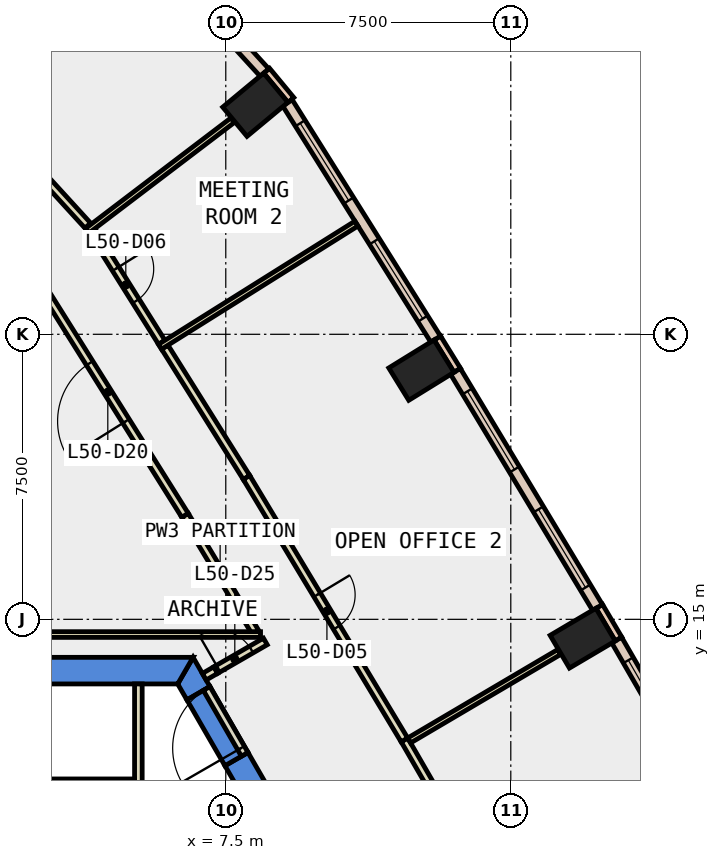
"""IFC4 building model, lengths in metres.
Left out: names, types, materials, properties, quantities, classifications, styles, units other than length and angle.
Written with IfcOpenShell. Run it as: python <this file> out.ifc"""

import sys

from ifc_helpers import new_model, si_unit, direction, frame, frame_2d, origin, origin_2d, place, context, subcontext, project, spatial, polyline, rectangle, outline, extrude, element, fill, save


model = new_model("IFC4")
c1 = context("Model", 3, precision=1e-05, world=origin(), true_north=direction((0.0, 1.0)))
c2 = subcontext(c1, "Body", "Model", "MODEL_VIEW")
j1 = project(units=[si_unit("LENGTHUNIT", "METRE"), si_unit("PLANEANGLEUNIT", "RADIAN")], contexts=[c1])
p1 = place(None, origin())
s1 = spatial("IfcSite", under=j1, at=p1, CompositionType="ELEMENT")
p2 = place(p1, origin())
s2 = spatial("IfcBuilding", under=s1, at=p2, CompositionType="ELEMENT")
p3 = place(p2, frame((0.0, 0.0, 223.4)))
s3 = spatial("IfcBuildingStorey", under=s2, at=p3, CompositionType="ELEMENT", Elevation=223.4)
for number, where, z_axis, x_axis in (
    (1, (16.892, 14.504, -0.4), (0.0, 0.0, 1.0), (-0.509, 0.861, 0.0)),
    (2, (12.648, 21.557, -0.4), (0.0, 0.0, 1.0), (-0.525, 0.851, 0.0)),
    (3, (8.278, 28.54, -0.4), (0.0, 0.0, 1.0), (-0.639, 0.769, 0.0)),
):
    element("IfcColumn", number, at=place(p3, frame(where, z_axis=z_axis, x_axis=x_axis)), inside=s3, PredefinedType="COLUMN", context=c2, shape_type="SweptSolid", body=[
        extrude(rectangle(XDim=1.0, YDim=1.4, at=origin_2d()), origin(), (0.0, 0.0, 1.0), 4.2),
    ])
p4 = place(p3, frame((0.0, 0.0, -0.4)))
e4 = element("IfcWall", 4, at=p4, inside=s3, PredefinedType="SHEAR", context=c2, shape_type="SweptSolid", body=[
    extrude(outline(polyline([(8.084, 11.498), (7.478, 11.148), (12.471, 2.5), (13.279, 2.5), (8.084, 11.498)])), origin(), (0.0, 0.0, 1.0), 4.2),
])
p5 = place(p3, frame((0.0, 0.0, -0.4)))
e5 = element("IfcWall", 5, at=p5, inside=s3, PredefinedType="SHEAR", context=c2, shape_type="SweptSolid", body=[
    extrude(outline(polyline([(6.478, 12.88), (7.084, 13.23), (6.64, 14.0), (6.235, 13.3), (6.478, 12.88)])), origin(), (0.0, 0.0, 1.0), 4.2),
])
p6 = place(p3, frame((0.0, 0.0, 3.6)))
e6 = element("IfcWall", 6, at=p6, inside=s3, PredefinedType="SHEAR", context=c2, shape_type="SweptSolid", body=[
    extrude(outline(polyline([(7.084, 13.23), (6.478, 12.88), (7.478, 11.148), (8.084, 11.498), (7.084, 13.23)])), origin(), (0.0, 0.0, 1.0), 0.2),
])
p7 = place(p3, frame((0.0, 0.0, -0.4)))
e7 = element("IfcWall", 7, at=p7, inside=s3, PredefinedType="SHEAR", context=c2, shape_type="SweptSolid", body=[
    extrude(outline(polyline([(6.64, 14.0), (-6.64, 14.0), (-6.235, 13.3), (6.235, 13.3), (6.64, 14.0)])), origin(), (0.0, 0.0, 1.0), 4.2),
])
p8 = place(p3, frame((17.835, 14.481, 0.0), z_axis=(0.0, 0.0, 1.0), x_axis=(-0.508161541526, 0.861261776531, 0.0)))
e8 = element("IfcWall", 8, at=p8, inside=s3, PredefinedType="STANDARD", context=c2, shape_type="SweptSolid", body=[
    extrude(rectangle(XDim=1.0, YDim=0.2, at=frame_2d((0.5, 0.0))), origin(), (0.0, 0.0, 1.0), 3.8),
])
p9 = place(p3, frame((13.592, 21.552, 0.0), z_axis=(0.0, 0.0, 1.0), x_axis=(-0.525825307325, 0.850592585306, 0.0)))
e9 = element("IfcWall", 9, at=p9, inside=s3, PredefinedType="STANDARD", context=c2, shape_type="SweptSolid", body=[
    extrude(rectangle(XDim=1.0, YDim=0.2, at=frame_2d((0.5, 0.0))), origin(), (0.0, 0.0, 1.0), 3.8),
])
p10 = place(p3, frame((9.213, 28.666, 0.0), z_axis=(0.0, 0.0, 1.0), x_axis=(-0.637972365578, 0.770059257953, 0.0)))
e10 = element("IfcWall", 10, at=p10, inside=s3, PredefinedType="STANDARD", context=c2, shape_type="SweptSolid", body=[
    extrude(rectangle(XDim=1.0, YDim=0.2, at=frame_2d((0.5, 0.0))), origin(), (0.0, 0.0, 1.0), 3.8),
])
p11 = place(p3, frame((21.411, 8.177, 0.0), z_axis=(0.0, 0.0, 1.0), x_axis=(-0.499968351115, 0.866043675505, 0.0)))
e11 = element("IfcWall", 11, at=p11, inside=s3, PredefinedType="STANDARD", context=c2, shape_type="SweptSolid", body=[
    extrude(rectangle(XDim=7.248, YDim=0.3, at=frame_2d((3.624, 0.0))), origin(), (0.0, 0.0, 1.0), 3.8),
])
p12 = place(p11, frame((0.612, 0.0, 0.9)))
e12 = element("IfcOpeningElement", 12, at=p12, cuts=e11, PredefinedType="OPENING", context=c2, shape_type="SweptSolid", body=[
    extrude(rectangle(XDim=2.4, YDim=2.6, at=frame_2d((1.2, 1.3))), frame((0.0, 0.16, 0.0), z_axis=(0.0, -1.0, 0.0), x_axis=(1.0, 0.0, 0.0)), (0.0, 0.0, 1.0), 0.32),
])
p13 = place(p11, frame((4.236, 0.0, 0.9)))
e13 = element("IfcOpeningElement", 13, at=p13, cuts=e11, PredefinedType="OPENING", context=c2, shape_type="SweptSolid", body=[
    extrude(rectangle(XDim=2.4, YDim=2.6, at=frame_2d((1.2, 1.3))), frame((0.0, 0.16, 0.0), z_axis=(0.0, -1.0, 0.0), x_axis=(1.0, 0.0, 0.0)), (0.0, 0.0, 1.0), 0.32),
])
p14 = place(p3, frame((17.281, 15.313, 0.0), z_axis=(0.0, 0.0, 1.0), x_axis=(-0.515560283412, 0.856853309597, 0.0)))
e14 = element("IfcWall", 14, at=p14, inside=s3, PredefinedType="STANDARD", context=c2, shape_type="SweptSolid", body=[
    extrude(rectangle(XDim=7.249, YDim=0.3, at=frame_2d((3.624, 0.0))), origin(), (0.0, 0.0, 1.0), 3.8),
])
p15 = place(p14, frame((0.612, 0.0, 0.9)))
e15 = element("IfcOpeningElement", 15, at=p15, cuts=e14, PredefinedType="OPENING", context=c2, shape_type="SweptSolid", body=[
    extrude(rectangle(XDim=2.4, YDim=2.6, at=frame_2d((1.2, 1.3))), frame((0.0, 0.16, 0.0), z_axis=(0.0, -1.0, 0.0), x_axis=(1.0, 0.0, 0.0)), (0.0, 0.0, 1.0), 0.32),
])
p16 = place(p14, frame((4.236, 0.0, 0.9)))
e16 = element("IfcOpeningElement", 16, at=p16, cuts=e14, PredefinedType="OPENING", context=c2, shape_type="SweptSolid", body=[
    extrude(rectangle(XDim=2.4, YDim=2.6, at=frame_2d((1.2, 1.3))), frame((0.0, 0.16, 0.0), z_axis=(0.0, -1.0, 0.0), x_axis=(1.0, 0.0, 0.0)), (0.0, 0.0, 1.0), 0.32),
])
p17 = place(p3, frame((13.021, 22.374, 0.0), z_axis=(0.0, 0.0, 1.0), x_axis=(-0.531239262679, 0.847221839773, 0.0)))
e17 = element("IfcWall", 17, at=p17, inside=s3, PredefinedType="STANDARD", context=c2, shape_type="SweptSolid", body=[
    extrude(rectangle(XDim=7.339, YDim=0.3, at=frame_2d((3.67, 0.0))), origin(), (0.0, 0.0, 1.0), 3.8),
])
p18 = place(p17, frame((0.635, 0.0, 0.9)))
e18 = element("IfcOpeningElement", 18, at=p18, cuts=e17, PredefinedType="OPENING", context=c2, shape_type="SweptSolid", body=[
    extrude(rectangle(XDim=2.4, YDim=2.6, at=frame_2d((1.2, 1.3))), frame((0.0, 0.16, 0.0), z_axis=(0.0, -1.0, 0.0), x_axis=(1.0, 0.0, 0.0)), (0.0, 0.0, 1.0), 0.32),
])
p19 = place(p17, frame((4.304, 0.0, 0.9)))
e19 = element("IfcOpeningElement", 19, at=p19, cuts=e17, PredefinedType="OPENING", context=c2, shape_type="SweptSolid", body=[
    extrude(rectangle(XDim=2.4, YDim=2.6, at=frame_2d((1.2, 1.3))), frame((0.0, 0.16, 0.0), z_axis=(0.0, -1.0, 0.0), x_axis=(1.0, 0.0, 0.0)), (0.0, 0.0, 1.0), 0.32),
])
p20 = place(p3, frame((8.518, 29.388, 0.0), z_axis=(0.0, 0.0, 1.0), x_axis=(-0.674487390017, 0.738286367684, 0.0)))
e20 = element("IfcWall", 20, at=p20, inside=s3, PredefinedType="STANDARD", context=c2, shape_type="SweptSolid", body=[
    extrude(rectangle(XDim=4.248, YDim=0.3, at=frame_2d((2.124, 0.0))), origin(), (0.0, 0.0, 1.0), 3.8),
])
p21 = place(p20, frame((1.424, 0.0, 0.9)))
e21 = element("IfcOpeningElement", 21, at=p21, cuts=e20, PredefinedType="OPENING", context=c2, shape_type="SweptSolid", body=[
    extrude(rectangle(XDim=1.4, YDim=2.6, at=frame_2d((0.7, 1.3))), frame((0.0, 0.16, 0.0), z_axis=(0.0, -1.0, 0.0), x_axis=(1.0, 0.0, 0.0)), (0.0, 0.0, 1.0), 0.32),
])
p22 = place(p3, frame((6.934, 13.49, 0.0), z_axis=(0.0, 0.0, 1.0), x_axis=(0.865871789474, 0.500265973451, 0.0)))
e22 = element("IfcWall", 22, at=p22, inside=s3, PredefinedType="PARTITIONING", context=c2, shape_type="SweptSolid", body=[
    extrude(rectangle(XDim=0.35, YDim=0.2, at=frame_2d((0.175, 0.0))), origin(), (0.0, 0.0, 1.0), 2.4),
])
p23 = place(p3, frame((8.276, 14.664, 0.0), z_axis=(0.0, 0.0, 1.0), x_axis=(-0.515416266777, 0.85693994652, 0.0)))
e23 = element("IfcWall", 23, at=p23, inside=s3, PredefinedType="PARTITIONING", context=c2, shape_type="SweptSolid", body=[
    extrude(rectangle(XDim=3.587, YDim=0.2, at=frame_2d((1.793, 0.0))), origin(), (0.0, 0.0, 1.0), 3.8),
])
p24 = place(p3, frame((6.427, 17.738, 0.0), z_axis=(0.0, 0.0, 1.0), x_axis=(-0.531335643981, 0.847161397512, 0.0)))
e24 = element("IfcWall", 24, at=p24, inside=s3, PredefinedType="PARTITIONING", context=c2, shape_type="SweptSolid", body=[
    extrude(rectangle(XDim=7.647, YDim=0.2, at=frame_2d((3.823, 0.0))), origin(), (0.0, 0.0, 1.0), 3.8),
])
p25 = place(p24, frame((2.923, 0.0, 0.0)))
e25 = element("IfcOpeningElement", 25, at=p25, cuts=e24, PredefinedType="OPENING", context=c2, shape_type="SweptSolid", body=[
    extrude(rectangle(XDim=1.8, YDim=2.1, at=frame_2d((0.9, 1.05))), frame((0.0, 0.11, 0.0), z_axis=(0.0, -1.0, 0.0), x_axis=(1.0, 0.0, 0.0)), (0.0, 0.0, 1.0), 0.22),
])
p26 = place(p3, frame((12.202, 11.828, 0.0), z_axis=(0.0, 0.0, 1.0), x_axis=(0.499919823193, -0.866071688937, 0.0)))
e26 = element("IfcWall", 26, at=p26, inside=s3, PredefinedType="PARTITIONING", context=c2, shape_type="SweptSolid", body=[
    extrude(rectangle(XDim=8.209, YDim=0.2, at=frame_2d((4.104, 0.0))), origin(), (0.0, 0.0, 1.0), 3.8),
])
p27 = place(p26, frame((3.604, 0.0, 0.0)))
e27 = element("IfcOpeningElement", 27, at=p27, cuts=e26, PredefinedType="OPENING", context=c2, shape_type="SweptSolid", body=[
    extrude(rectangle(XDim=1.0, YDim=2.1, at=frame_2d((0.5, 1.05))), frame((0.0, 0.11, 0.0), z_axis=(0.0, -1.0, 0.0), x_axis=(1.0, 0.0, 0.0)), (0.0, 0.0, 1.0), 0.22),
])
p28 = place(p3, frame((5.895, 22.162, 0.0), z_axis=(0.0, 0.0, 1.0), x_axis=(0.531245023709, -0.847218227368, 0.0)))
e28 = element("IfcWall", 28, at=p28, inside=s3, PredefinedType="PARTITIONING", context=c2, shape_type="SweptSolid", body=[
    extrude(rectangle(XDim=4.049, YDim=0.2, at=frame_2d((2.024, 0.0))), origin(), (0.0, 0.0, 1.0), 3.8),
])
p29 = place(p3, frame((8.046, 18.732, 0.0), z_axis=(0.0, 0.0, 1.0), x_axis=(0.515502328211, -0.856888178007, 0.0)))
e29 = element("IfcWall", 29, at=p29, inside=s3, PredefinedType="PARTITIONING", context=c2, shape_type="SweptSolid", body=[
    extrude(rectangle(XDim=8.058, YDim=0.2, at=frame_2d((4.029, 0.0))), origin(), (0.0, 0.0, 1.0), 3.8),
])
p30 = place(p29, frame((3.604, 0.0, 0.0)))
e30 = element("IfcOpeningElement", 30, at=p30, cuts=e29, PredefinedType="OPENING", context=c2, shape_type="SweptSolid", body=[
    extrude(rectangle(XDim=1.0, YDim=2.1, at=frame_2d((0.5, 1.05))), frame((0.0, 0.11, 0.0), z_axis=(0.0, -1.0, 0.0), x_axis=(1.0, 0.0, 0.0)), (0.0, 0.0, 1.0), 0.22),
])
p31 = place(p3, frame((3.923, 25.307, 0.0), z_axis=(0.0, 0.0, 1.0), x_axis=(0.531150612982, -0.847277419934, 0.0)))
e31 = element("IfcWall", 31, at=p31, inside=s3, PredefinedType="PARTITIONING", context=c2, shape_type="SweptSolid", body=[
    extrude(rectangle(XDim=3.562, YDim=0.2, at=frame_2d((1.781, 0.0))), origin(), (0.0, 0.0, 1.0), 3.8),
])
p32 = place(p31, frame((1.281, 0.0, 0.0)))
e32 = element("IfcOpeningElement", 32, at=p32, cuts=e31, PredefinedType="OPENING", context=c2, shape_type="SweptSolid", body=[
    extrude(rectangle(XDim=1.0, YDim=2.1, at=frame_2d((0.5, 1.05))), frame((0.0, 0.11, 0.0), z_axis=(0.0, -1.0, 0.0), x_axis=(1.0, 0.0, 0.0)), (0.0, 0.0, 1.0), 0.22),
])
p33 = place(p3, frame((1.841, 27.579, 0.0), z_axis=(0.0, 0.0, 1.0), x_axis=(0.674594755709, -0.738188265668, 0.0)))
e33 = element("IfcWall", 33, at=p33, inside=s3, PredefinedType="PARTITIONING", context=c2, shape_type="SweptSolid", body=[
    extrude(rectangle(XDim=3.006, YDim=0.2, at=frame_2d((1.503, 0.0))), origin(), (0.0, 0.0, 1.0), 3.8),
])
p34 = place(p3, frame((5.2, 13.3, 0.0), z_axis=(0.0, 0.0, 1.0), x_axis=(0.0, -1.0, 0.0)))
e34 = element("IfcWall", 34, at=p34, inside=s3, PredefinedType="PARTITIONING", context=c2, shape_type="SweptSolid", body=[
    extrude(rectangle(XDim=2.7, YDim=0.2, at=frame_2d((1.35, 0.0))), origin(), (0.0, 0.0, 1.0), 3.8),
])
p35 = place(p3, frame((5.1, 10.7, 0.0), z_axis=(0.0, 0.0, 1.0), x_axis=(-1.0, 0.0, 0.0)))
e35 = element("IfcWall", 35, at=p35, inside=s3, PredefinedType="PARTITIONING", context=c2, shape_type="SweptSolid", body=[
    extrude(rectangle(XDim=2.4, YDim=0.2, at=frame_2d((1.2, 0.0))), origin(), (0.0, 0.0, 1.0), 3.8),
])
p36 = place(p35, frame((0.75, 0.0, 0.0)))
e36 = element("IfcOpeningElement", 36, at=p36, cuts=e35, PredefinedType="OPENING", context=c2, shape_type="SweptSolid", body=[
    extrude(rectangle(XDim=0.9, YDim=2.1, at=frame_2d((0.45, 1.05))), frame((0.0, 0.11, 0.0), z_axis=(0.0, -1.0, 0.0), x_axis=(1.0, 0.0, 0.0)), (0.0, 0.0, 1.0), 0.22),
])
p37 = place(p3, frame((8.415, 14.6, 0.0), z_axis=(0.0, 0.0, 1.0), x_axis=(-1.0, 0.0, 0.0)))
e37 = element("IfcWall", 37, at=p37, inside=s3, PredefinedType="PARTITIONING", context=c2, shape_type="SweptSolid", body=[
    extrude(rectangle(XDim=8.015, YDim=0.15, at=frame_2d((4.008, 0.0))), origin(), (0.0, 0.0, 1.0), 3.8),
])
p38 = place(p3, frame((12.326, 11.813, 0.0), z_axis=(0.0, 0.0, 1.0), x_axis=(0.861428100003, 0.507879541353, 0.0)))
e38 = element("IfcWall", 38, at=p38, inside=s3, PredefinedType="PARTITIONING", context=c2, shape_type="SweptSolid", body=[
    extrude(rectangle(XDim=4.58, YDim=0.15, at=frame_2d((2.29, 0.0))), origin(), (0.0, 0.0, 1.0), 3.8),
])
p39 = place(p3, frame((5.77, 22.172, 0.0), z_axis=(0.0, 0.0, 1.0), x_axis=(0.847187879248, 0.531293419171, 0.0)))
e39 = element("IfcWall", 39, at=p39, inside=s3, PredefinedType="PARTITIONING", context=c2, shape_type="SweptSolid", body=[
    extrude(rectangle(XDim=6.1, YDim=0.15, at=frame_2d((3.05, 0.0))), origin(), (0.0, 0.0, 1.0), 3.8),
])
p40 = place(p3, frame((3.856, 25.225, 0.0), z_axis=(0.0, 0.0, 1.0), x_axis=(0.795987848728, 0.605312600792, 0.0)))
e40 = element("IfcWall", 40, at=p40, inside=s3, PredefinedType="PARTITIONING", context=c2, shape_type="SweptSolid", body=[
    extrude(rectangle(XDim=4.804, YDim=0.15, at=frame_2d((2.402, 0.0))), origin(), (0.0, 0.0, 1.0), 3.8),
])
p41 = place(p3, frame((7.997, 11.448, 0.0), z_axis=(0.0, 0.0, 1.0), x_axis=(-0.50002537861, 0.866010750942, 0.0)))
e41 = element("IfcWall", 41, at=p41, inside=s3, PredefinedType="PARTITIONING", context=c2, shape_type="SweptSolid", body=[
    extrude(rectangle(XDim=2.0, YDim=0.2, at=frame_2d((1.0, 0.0))), origin(), (0.0, 0.0, 1.0), 2.4),
])
p42 = place(p41, frame((0.19, 0.0, 0.0)))
e42 = element("IfcOpeningElement", 42, at=p42, cuts=e41, PredefinedType="OPENING", context=c2, shape_type="SweptSolid", body=[
    extrude(rectangle(XDim=1.8, YDim=2.1, at=frame_2d((0.9, 1.05))), frame((0.0, 0.11, 0.0), z_axis=(0.0, -1.0, 0.0), x_axis=(1.0, 0.0, 0.0)), (0.0, 0.0, 1.0), 0.22),
])
p43 = place(p3, frame((7.237, 13.665, 0.0), z_axis=(0.0, 0.0, 1.0), x_axis=(0.865999269783, 0.500045262687, 0.0)))
e43 = element("IfcWall", 43, at=p43, inside=s3, PredefinedType="PARTITIONING", context=c2, shape_type="SweptSolid", body=[
    extrude(rectangle(XDim=1.506, YDim=0.2, at=frame_2d((0.753, 0.0))), origin(), (0.0, 0.0, 1.0), 3.8),
])
p44 = place(p43, frame((0.078, 0.0, 0.0)))
e44 = element("IfcOpeningElement", 44, at=p44, cuts=e43, PredefinedType="OPENING", context=c2, shape_type="SweptSolid", body=[
    extrude(rectangle(XDim=1.0, YDim=2.1, at=frame_2d((0.5, 1.05))), frame((0.0, 0.11, 0.0), z_axis=(0.0, -1.0, 0.0), x_axis=(1.0, 0.0, 0.0)), (0.0, 0.0, 1.0), 0.22),
])
p45 = place(p13, origin())
e45 = element("IfcWindow", 45, at=p45, inside=s3, PartitioningType="SINGLE_PANEL", PredefinedType="WINDOW", context=c2, shape_type="SweptSolid", body=[
    extrude(rectangle(XDim=2.4, YDim=2.6, at=frame_2d((1.2, 1.3))), frame((0.0, 0.03, 0.0), z_axis=(0.0, -1.0, 0.0), x_axis=(1.0, 0.0, 0.0)), (0.0, 0.0, 1.0), 0.06),
])
fill(e13, e45)
p46 = place(p15, origin())
e46 = element("IfcWindow", 46, at=p46, inside=s3, PartitioningType="SINGLE_PANEL", PredefinedType="WINDOW", context=c2, shape_type="SweptSolid", body=[
    extrude(rectangle(XDim=2.4, YDim=2.6, at=frame_2d((1.2, 1.3))), frame((0.0, 0.03, 0.0), z_axis=(0.0, -1.0, 0.0), x_axis=(1.0, 0.0, 0.0)), (0.0, 0.0, 1.0), 0.06),
])
fill(e15, e46)
p47 = place(p16, origin())
e47 = element("IfcWindow", 47, at=p47, inside=s3, PartitioningType="SINGLE_PANEL", PredefinedType="WINDOW", context=c2, shape_type="SweptSolid", body=[
    extrude(rectangle(XDim=2.4, YDim=2.6, at=frame_2d((1.2, 1.3))), frame((0.0, 0.03, 0.0), z_axis=(0.0, -1.0, 0.0), x_axis=(1.0, 0.0, 0.0)), (0.0, 0.0, 1.0), 0.06),
])
fill(e16, e47)
p48 = place(p18, origin())
e48 = element("IfcWindow", 48, at=p48, inside=s3, PartitioningType="SINGLE_PANEL", PredefinedType="WINDOW", context=c2, shape_type="SweptSolid", body=[
    extrude(rectangle(XDim=2.4, YDim=2.6, at=frame_2d((1.2, 1.3))), frame((0.0, 0.03, 0.0), z_axis=(0.0, -1.0, 0.0), x_axis=(1.0, 0.0, 0.0)), (0.0, 0.0, 1.0), 0.06),
])
fill(e18, e48)
p49 = place(p19, origin())
e49 = element("IfcWindow", 49, at=p49, inside=s3, PartitioningType="SINGLE_PANEL", PredefinedType="WINDOW", context=c2, shape_type="SweptSolid", body=[
    extrude(rectangle(XDim=2.4, YDim=2.6, at=frame_2d((1.2, 1.3))), frame((0.0, 0.03, 0.0), z_axis=(0.0, -1.0, 0.0), x_axis=(1.0, 0.0, 0.0)), (0.0, 0.0, 1.0), 0.06),
])
fill(e19, e49)
p50 = place(p30, origin())
e50 = element("IfcDoor", 50, at=p50, inside=s3, OperationType="SINGLE_SWING_RIGHT", PredefinedType="DOOR", context=c2, shape_type="SweptSolid", body=[
    extrude(rectangle(XDim=1.0, YDim=2.1, at=frame_2d((0.5, 1.05))), frame((0.0, 0.025, 0.0), z_axis=(0.0, -1.0, 0.0), x_axis=(1.0, 0.0, 0.0)), (0.0, 0.0, 1.0), 0.05),
])
fill(e30, e50)
p51 = place(p32, origin())
e51 = element("IfcDoor", 51, at=p51, inside=s3, OperationType="SINGLE_SWING_LEFT", PredefinedType="DOOR", context=c2, shape_type="SweptSolid", body=[
    extrude(rectangle(XDim=1.0, YDim=2.1, at=frame_2d((0.5, 1.05))), frame((0.0, 0.025, 0.0), z_axis=(0.0, -1.0, 0.0), x_axis=(1.0, 0.0, 0.0)), (0.0, 0.0, 1.0), 0.05),
])
fill(e32, e51)
p52 = place(p25, origin())
e52 = element("IfcDoor", 52, at=p52, inside=s3, OperationType="DOUBLE_DOOR_SINGLE_SWING", PredefinedType="DOOR", context=c2, shape_type="SweptSolid", body=[
    extrude(rectangle(XDim=1.8, YDim=2.1, at=frame_2d((0.9, 1.05))), frame((0.0, 0.025, 0.0), z_axis=(0.0, -1.0, 0.0), x_axis=(1.0, 0.0, 0.0)), (0.0, 0.0, 1.0), 0.05),
])
fill(e25, e52)
p53 = place(p44, origin())
e53 = element("IfcDoor", 53, at=p53, inside=s3, OperationType="SINGLE_SWING_LEFT", PredefinedType="DOOR", context=c2, shape_type="SweptSolid", body=[
    extrude(rectangle(XDim=1.0, YDim=2.1, at=frame_2d((0.5, 1.05))), frame((0.0, 0.025, 0.0), z_axis=(0.0, -1.0, 0.0), x_axis=(1.0, 0.0, 0.0)), (0.0, 0.0, 1.0), 0.05),
])
fill(e44, e53)
p54 = place(p42, origin())
e54 = element("IfcDoor", 54, at=p54, inside=s3, OperationType="DOUBLE_DOOR_SINGLE_SWING", PredefinedType="DOOR", context=c2, shape_type="SweptSolid", body=[
    extrude(rectangle(XDim=1.8, YDim=2.1, at=frame_2d((0.9, 1.05))), frame((0.0, 0.025, 0.0), z_axis=(0.0, -1.0, 0.0), x_axis=(1.0, 0.0, 0.0)), (0.0, 0.0, 1.0), 0.05),
])
fill(e42, e54)
save(model, sys.argv[1])
